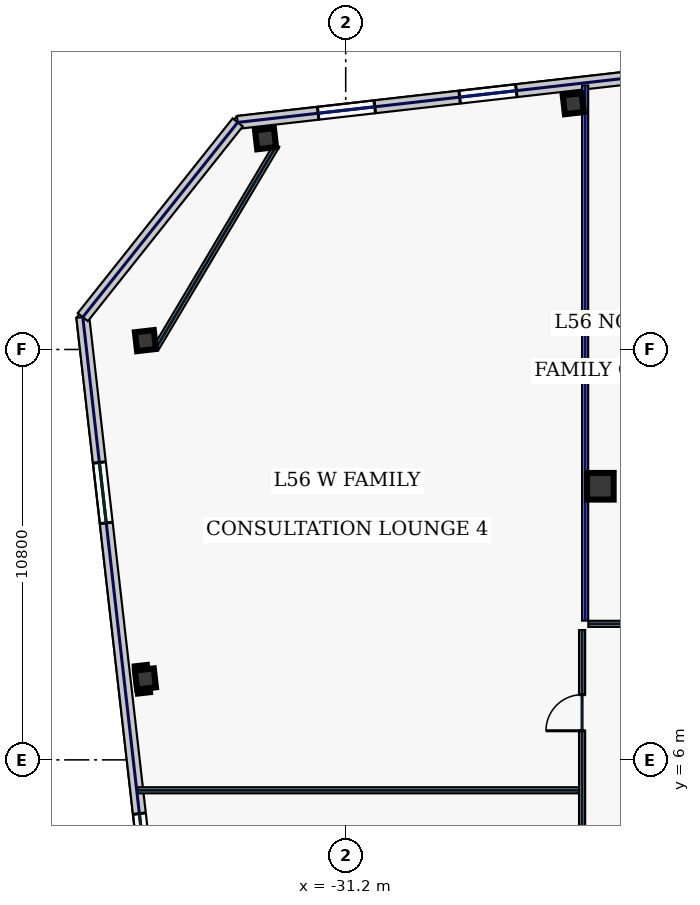
"""IFC4 building model, lengths in metres.
Left out: names, types, materials, properties, quantities, classifications, styles, units other than length and angle.
Written with IfcOpenShell. Run it as: python <this file> out.ifc"""

import sys

from ifc_helpers import new_model, si_unit, direction, frame, frame_2d, origin, origin_2d, place, context, subcontext, project, spatial, rectangle, hollow_rectangle, extrude, element, fill, save


model = new_model("IFC4")
c1 = context("Model", 3, precision=1e-05, world=origin(), true_north=direction((0.0, 1.0)))
c2 = subcontext(c1, "Body", "Model", "MODEL_VIEW")
j1 = project(units=[si_unit("LENGTHUNIT", "METRE"), si_unit("PLANEANGLEUNIT", "RADIAN")], contexts=[c1])
p1 = place(None, origin())
s1 = spatial("IfcSite", under=j1, at=p1, CompositionType="ELEMENT")
p2 = place(p1, origin())
s2 = spatial("IfcBuilding", under=s1, at=p2, CompositionType="ELEMENT")
p3 = place(p2, frame((0.0, 0.0, 243.0)))
s3 = spatial("IfcBuildingStorey", under=s2, at=p3, CompositionType="ELEMENT", Elevation=243.0)
p4 = place(p3, frame((-24.5, 13.2, 0.0), z_axis=(0.0, 0.0, 1.0), x_axis=(1.0, 0.0, 0.0)))
e1 = element("IfcColumn", 1, at=p4, inside=s3, PredefinedType="COLUMN", context=c2, shape_type="SweptSolid", body=[
    extrude(hollow_rectangle(XDim=0.7, YDim=0.7, WallThickness=0.032, at=origin_2d()), origin(), (0.0, 0.0, 1.0), 3.74),
])
for number, where, z_axis, x_axis in (
    (2, (-25.212, 23.268, 0.0), (0.0, 0.0, 1.0), (0.994, 0.113, 0.0)),
    (3, (-33.309, 22.345, 0.0), (0.0, 0.0, 1.0), (0.994, 0.113, 0.0)),
    (4, (-36.47, 17.033, 0.0), (0.0, 0.0, 1.0), (0.994, 0.113, 0.0)),
    (5, (-36.47, 8.131, 0.0), (0.0, 0.0, 1.0), (0.994, 0.113, 0.0)),
):
    element("IfcColumn", number, at=place(p3, frame(where, z_axis=z_axis, x_axis=x_axis)), inside=s3, PredefinedType="COLUMN", context=c2, shape_type="SweptSolid", body=[
        extrude(hollow_rectangle(XDim=0.5, YDim=0.5, WallThickness=0.025, at=origin_2d()), origin(), (0.0, 0.0, 1.0), 3.74),
    ])
p5 = place(p3, frame((-15.51, 24.886, 0.0), z_axis=(0.0, 0.0, 1.0), x_axis=(-0.993572271362, -0.113199565282, 0.0)))
e6 = element("IfcWall", 6, at=p5, inside=s3, PredefinedType="STANDARD", context=c2, shape_type="SweptSolid", body=[
    extrude(rectangle(XDim=18.651, YDim=0.34, at=frame_2d((9.326, 0.0))), origin(), (0.0, 0.0, 1.0), 3.74),
])
p6 = place(p5, frame((15.021, 0.0, 0.83)))
e7 = element("IfcOpeningElement", 7, at=p6, cuts=e6, PredefinedType="OPENING", context=c2, shape_type="SweptSolid", body=[
    extrude(rectangle(XDim=1.5, YDim=2.0, at=frame_2d((0.75, 1.0))), frame((0.0, 0.18, 0.0), z_axis=(0.0, -1.0, 0.0), x_axis=(1.0, 0.0, 0.0)), (0.0, 0.0, 1.0), 0.36),
])
p7 = place(p5, frame((11.273, 0.0, 0.83)))
e8 = element("IfcOpeningElement", 8, at=p7, cuts=e6, PredefinedType="OPENING", context=c2, shape_type="SweptSolid", body=[
    extrude(rectangle(XDim=1.5, YDim=2.0, at=frame_2d((0.75, 1.0))), frame((0.0, 0.18, 0.0), z_axis=(0.0, -1.0, 0.0), x_axis=(1.0, 0.0, 0.0)), (0.0, 0.0, 1.0), 0.36),
])
p8 = place(p5, frame((6.873, 0.0, 0.83)))
e9 = element("IfcOpeningElement", 9, at=p8, cuts=e6, PredefinedType="OPENING", context=c2, shape_type="SweptSolid", body=[
    extrude(rectangle(XDim=1.5, YDim=2.0, at=frame_2d((0.75, 1.0))), frame((0.0, 0.18, 0.0), z_axis=(0.0, -1.0, 0.0), x_axis=(1.0, 0.0, 0.0)), (0.0, 0.0, 1.0), 0.36),
])
p9 = place(p5, frame((3.125, 0.0, 0.83)))
e10 = element("IfcOpeningElement", 10, at=p9, cuts=e6, PredefinedType="OPENING", context=c2, shape_type="SweptSolid", body=[
    extrude(rectangle(XDim=0.85, YDim=1.85, at=frame_2d((0.425, 0.925))), frame((0.0, 0.18, 0.0), z_axis=(0.0, -1.0, 0.0), x_axis=(1.0, 0.0, 0.0)), (0.0, 0.0, 1.0), 0.36),
])
p10 = place(p3, frame((-38.118, 17.651, 0.0), z_axis=(0.0, 0.0, 1.0), x_axis=(0.11320360501, -0.9935718111, 0.0)))
e11 = element("IfcWall", 11, at=p10, inside=s3, PredefinedType="STANDARD", context=c2, shape_type="SweptSolid", body=[
    extrude(rectangle(XDim=37.2, YDim=0.34, at=frame_2d((18.6, 0.0))), origin(), (0.0, 0.0, 1.0), 3.74),
])
p11 = place(p10, frame((3.85, 0.0, 0.58)))
e12 = element("IfcOpeningElement", 12, at=p11, cuts=e11, PredefinedType="OPENING", context=c2, shape_type="SweptSolid", body=[
    extrude(rectangle(XDim=1.6, YDim=2.3, at=frame_2d((0.8, 1.15))), frame((0.0, 0.18, 0.0), z_axis=(0.0, -1.0, 0.0), x_axis=(1.0, 0.0, 0.0)), (0.0, 0.0, 1.0), 0.36),
])
p12 = place(p10, frame((13.15, 0.0, 0.58)))
e13 = element("IfcOpeningElement", 13, at=p12, cuts=e11, PredefinedType="OPENING", context=c2, shape_type="SweptSolid", body=[
    extrude(rectangle(XDim=1.6, YDim=2.3, at=frame_2d((0.8, 1.15))), frame((0.0, 0.18, 0.0), z_axis=(0.0, -1.0, 0.0), x_axis=(1.0, 0.0, 0.0)), (0.0, 0.0, 1.0), 0.36),
])
p13 = place(p10, frame((31.75, 0.0, 0.58)))
e14 = element("IfcOpeningElement", 14, at=p13, cuts=e11, PredefinedType="OPENING", context=c2, shape_type="SweptSolid", body=[
    extrude(rectangle(XDim=1.6, YDim=2.3, at=frame_2d((0.8, 1.15))), frame((0.0, 0.18, 0.0), z_axis=(0.0, -1.0, 0.0), x_axis=(1.0, 0.0, 0.0)), (0.0, 0.0, 1.0), 0.36),
])
p14 = place(p3, frame((-34.042, 22.775, 0.0), z_axis=(0.0, 0.0, 1.0), x_axis=(-0.62252823689, -0.78259733853, 0.0)))
e15 = element("IfcWall", 15, at=p14, inside=s3, PredefinedType="STANDARD", context=c2, shape_type="SweptSolid", body=[
    extrude(rectangle(XDim=6.548, YDim=0.34, at=frame_2d((3.274, 0.0))), origin(), (0.0, 0.0, 1.0), 3.74),
])
p15 = place(p3, frame((-33.016, 22.171, 0.0), z_axis=(0.0, 0.0, 1.0), x_axis=(-0.511385266265, -0.859351563359, 0.0)))
e16 = element("IfcWall", 16, at=p15, inside=s3, PredefinedType="PARTITIONING", context=c2, shape_type="SweptSolid", body=[
    extrude(rectangle(XDim=6.182, YDim=0.16, at=frame_2d((3.091, 0.0))), origin(), (0.0, 0.0, 1.0), 3.74),
])
p16 = place(p3, frame((-24.98, -9.215, 0.0), z_axis=(0.0, 0.0, 1.0), x_axis=(0.0, 1.0, 0.0)))
e17 = element("IfcWall", 17, at=p16, inside=s3, PredefinedType="PARTITIONING", context=c2, shape_type="SweptSolid", body=[
    extrude(rectangle(XDim=18.63, YDim=0.16, at=frame_2d((9.315, 0.0))), origin(), (0.0, 0.0, 1.0), 3.74),
])
p17 = place(p16, frame((1.769, 0.0, 0.0)))
e18 = element("IfcOpeningElement", 18, at=p17, cuts=e17, PredefinedType="OPENING", context=c2, shape_type="SweptSolid", body=[
    extrude(rectangle(XDim=0.95, YDim=2.2, at=frame_2d((0.475, 1.1))), frame((0.0, 0.09, 0.0), z_axis=(0.0, -1.0, 0.0), x_axis=(1.0, 0.0, 0.0)), (0.0, 0.0, 1.0), 0.18),
])
p18 = place(p16, frame((5.6, 0.0, 0.0)))
e19 = element("IfcOpeningElement", 19, at=p18, cuts=e17, PredefinedType="OPENING", context=c2, shape_type="SweptSolid", body=[
    extrude(rectangle(XDim=0.95, YDim=2.2, at=frame_2d((0.475, 1.1))), frame((0.0, 0.09, 0.0), z_axis=(0.0, -1.0, 0.0), x_axis=(1.0, 0.0, 0.0)), (0.0, 0.0, 1.0), 0.18),
])
p19 = place(p16, frame((10.8, 0.0, 0.0)))
e20 = element("IfcOpeningElement", 20, at=p19, cuts=e17, PredefinedType="OPENING", context=c2, shape_type="SweptSolid", body=[
    extrude(rectangle(XDim=0.95, YDim=2.2, at=frame_2d((0.475, 1.1))), frame((0.0, 0.09, 0.0), z_axis=(0.0, -1.0, 0.0), x_axis=(1.0, 0.0, 0.0)), (0.0, 0.0, 1.0), 0.18),
])
p20 = place(p16, frame((15.981, 0.0, 0.0)))
e21 = element("IfcOpeningElement", 21, at=p20, cuts=e17, PredefinedType="OPENING", context=c2, shape_type="SweptSolid", body=[
    extrude(rectangle(XDim=0.95, YDim=2.2, at=frame_2d((0.475, 1.1))), frame((0.0, 0.09, 0.0), z_axis=(0.0, -1.0, 0.0), x_axis=(1.0, 0.0, 0.0)), (0.0, 0.0, 1.0), 0.18),
])
p21 = place(p3, frame((-24.815, 9.58, 0.0), z_axis=(0.0, 0.0, 1.0), x_axis=(1.0, 0.0, 0.0)))
e22 = element("IfcWall", 22, at=p21, inside=s3, PredefinedType="PARTITIONING", context=c2, shape_type="SweptSolid", body=[
    extrude(rectangle(XDim=49.63, YDim=0.16, at=frame_2d((24.815, 0.0))), origin(), (0.0, 0.0, 1.0), 3.74),
])
p22 = place(p21, frame((2.044, 0.0, 0.0)))
e23 = element("IfcOpeningElement", 23, at=p22, cuts=e22, PredefinedType="OPENING", context=c2, shape_type="SweptSolid", body=[
    extrude(rectangle(XDim=0.95, YDim=2.2, at=frame_2d((0.475, 1.1))), frame((0.0, 0.09, 0.0), z_axis=(0.0, -1.0, 0.0), x_axis=(1.0, 0.0, 0.0)), (0.0, 0.0, 1.0), 0.18),
])
p23 = place(p21, frame((6.025, 0.0, 0.0)))
e24 = element("IfcOpeningElement", 24, at=p23, cuts=e22, PredefinedType="OPENING", context=c2, shape_type="SweptSolid", body=[
    extrude(rectangle(XDim=1.3, YDim=2.2, at=frame_2d((0.65, 1.1))), frame((0.0, 0.09, 0.0), z_axis=(0.0, -1.0, 0.0), x_axis=(1.0, 0.0, 0.0)), (0.0, 0.0, 1.0), 0.18),
])
p24 = place(p21, frame((10.875, 0.0, 0.0)))
e25 = element("IfcOpeningElement", 25, at=p24, cuts=e22, PredefinedType="OPENING", context=c2, shape_type="SweptSolid", body=[
    extrude(rectangle(XDim=1.3, YDim=2.2, at=frame_2d((0.65, 1.1))), frame((0.0, 0.09, 0.0), z_axis=(0.0, -1.0, 0.0), x_axis=(1.0, 0.0, 0.0)), (0.0, 0.0, 1.0), 0.18),
])
p25 = place(p21, frame((16.25, 0.0, 0.0)))
e26 = element("IfcOpeningElement", 26, at=p25, cuts=e22, PredefinedType="OPENING", context=c2, shape_type="SweptSolid", body=[
    extrude(rectangle(XDim=1.05, YDim=2.2, at=frame_2d((0.525, 1.1))), frame((0.0, 0.09, 0.0), z_axis=(0.0, -1.0, 0.0), x_axis=(1.0, 0.0, 0.0)), (0.0, 0.0, 1.0), 0.18),
])
p26 = place(p21, frame((21.94, 0.0, 0.0)))
e27 = element("IfcOpeningElement", 27, at=p26, cuts=e22, PredefinedType="OPENING", context=c2, shape_type="SweptSolid", body=[
    extrude(rectangle(XDim=0.95, YDim=2.2, at=frame_2d((0.475, 1.1))), frame((0.0, 0.09, 0.0), z_axis=(0.0, -1.0, 0.0), x_axis=(1.0, 0.0, 0.0)), (0.0, 0.0, 1.0), 0.18),
])
p27 = place(p21, frame((29.698, 0.0, 0.0)))
e28 = element("IfcOpeningElement", 28, at=p27, cuts=e22, PredefinedType="OPENING", context=c2, shape_type="SweptSolid", body=[
    extrude(rectangle(XDim=1.45, YDim=2.2, at=frame_2d((0.725, 1.1))), frame((0.0, 0.09, 0.0), z_axis=(0.0, -1.0, 0.0), x_axis=(1.0, 0.0, 0.0)), (0.0, 0.0, 1.0), 0.18),
])
p28 = place(p21, frame((36.683, 0.0, 0.0)))
e29 = element("IfcOpeningElement", 29, at=p28, cuts=e22, PredefinedType="OPENING", context=c2, shape_type="SweptSolid", body=[
    extrude(rectangle(XDim=1.3, YDim=2.2, at=frame_2d((0.65, 1.1))), frame((0.0, 0.09, 0.0), z_axis=(0.0, -1.0, 0.0), x_axis=(1.0, 0.0, 0.0)), (0.0, 0.0, 1.0), 0.18),
])
p29 = place(p21, frame((42.55, 0.0, 0.0)))
e30 = element("IfcOpeningElement", 30, at=p29, cuts=e22, PredefinedType="OPENING", context=c2, shape_type="SweptSolid", body=[
    extrude(rectangle(XDim=0.95, YDim=2.2, at=frame_2d((0.475, 1.1))), frame((0.0, 0.09, 0.0), z_axis=(0.0, -1.0, 0.0), x_axis=(1.0, 0.0, 0.0)), (0.0, 0.0, 1.0), 0.18),
])
p30 = place(p21, frame((46.806, 0.0, 0.0)))
e31 = element("IfcOpeningElement", 31, at=p30, cuts=e22, PredefinedType="OPENING", context=c2, shape_type="SweptSolid", body=[
    extrude(rectangle(XDim=1.05, YDim=2.2, at=frame_2d((0.525, 1.1))), frame((0.0, 0.09, 0.0), z_axis=(0.0, -1.0, 0.0), x_axis=(1.0, 0.0, 0.0)), (0.0, 0.0, 1.0), 0.18),
])
p31 = place(p3, frame((-24.9, 9.665, 0.0), z_axis=(0.0, 0.0, 1.0), x_axis=(0.0, 1.0, 0.0)))
e32 = element("IfcWall", 32, at=p31, inside=s3, PredefinedType="PARTITIONING", context=c2, shape_type="SweptSolid", body=[
    extrude(rectangle(XDim=14.081, YDim=0.16, at=frame_2d((7.041, 0.0))), origin(), (0.0, 0.0, 1.0), 3.285),
])
p32 = place(p3, frame((-36.679, 5.2, 0.0), z_axis=(0.0, 0.0, 1.0), x_axis=(1.0, 0.0, 0.0)))
e33 = element("IfcWall", 33, at=p32, inside=s3, PredefinedType="PARTITIONING", context=c2, shape_type="SweptSolid", body=[
    extrude(rectangle(XDim=11.615, YDim=0.16, at=frame_2d((5.807, 0.0))), origin(), (0.0, 0.0, 1.0), 3.74),
])
p33 = place(p6, origin())
e34 = element("IfcWindow", 34, at=p33, inside=s3, PartitioningType="SINGLE_PANEL", PredefinedType="WINDOW", context=c2, shape_type="SweptSolid", body=[
    extrude(rectangle(XDim=1.5, YDim=2.0, at=frame_2d((0.75, 1.0))), frame((0.0, 0.03, 0.0), z_axis=(0.0, -1.0, 0.0), x_axis=(1.0, 0.0, 0.0)), (0.0, 0.0, 1.0), 0.06),
])
fill(e7, e34)
p34 = place(p7, origin())
e35 = element("IfcWindow", 35, at=p34, inside=s3, PartitioningType="SINGLE_PANEL", PredefinedType="WINDOW", context=c2, shape_type="SweptSolid", body=[
    extrude(rectangle(XDim=1.5, YDim=2.0, at=frame_2d((0.75, 1.0))), frame((0.0, 0.03, 0.0), z_axis=(0.0, -1.0, 0.0), x_axis=(1.0, 0.0, 0.0)), (0.0, 0.0, 1.0), 0.06),
])
fill(e8, e35)
p35 = place(p11, origin())
e36 = element("IfcWindow", 36, at=p35, inside=s3, PartitioningType="SINGLE_PANEL", PredefinedType="WINDOW", context=c2, shape_type="SweptSolid", body=[
    extrude(rectangle(XDim=1.6, YDim=2.3, at=frame_2d((0.8, 1.15))), frame((0.0, 0.03, 0.0), z_axis=(0.0, -1.0, 0.0), x_axis=(1.0, 0.0, 0.0)), (0.0, 0.0, 1.0), 0.06),
])
fill(e12, e36)
p36 = place(p12, origin())
e37 = element("IfcWindow", 37, at=p36, inside=s3, PartitioningType="SINGLE_PANEL", PredefinedType="WINDOW", context=c2, shape_type="SweptSolid", body=[
    extrude(rectangle(XDim=1.6, YDim=2.3, at=frame_2d((0.8, 1.15))), frame((0.0, 0.03, 0.0), z_axis=(0.0, -1.0, 0.0), x_axis=(1.0, 0.0, 0.0)), (0.0, 0.0, 1.0), 0.06),
])
fill(e13, e37)
p37 = place(p20, origin())
e38 = element("IfcDoor", 38, at=p37, inside=s3, OperationType="SINGLE_SWING_LEFT", PredefinedType="DOOR", context=c2, shape_type="SweptSolid", body=[
    extrude(rectangle(XDim=0.95, YDim=2.2, at=frame_2d((0.475, 1.1))), frame((0.0, 0.025, 0.0), z_axis=(0.0, -1.0, 0.0), x_axis=(1.0, 0.0, 0.0)), (0.0, 0.0, 1.0), 0.05),
])
fill(e21, e38)
save(model, sys.argv[1])
